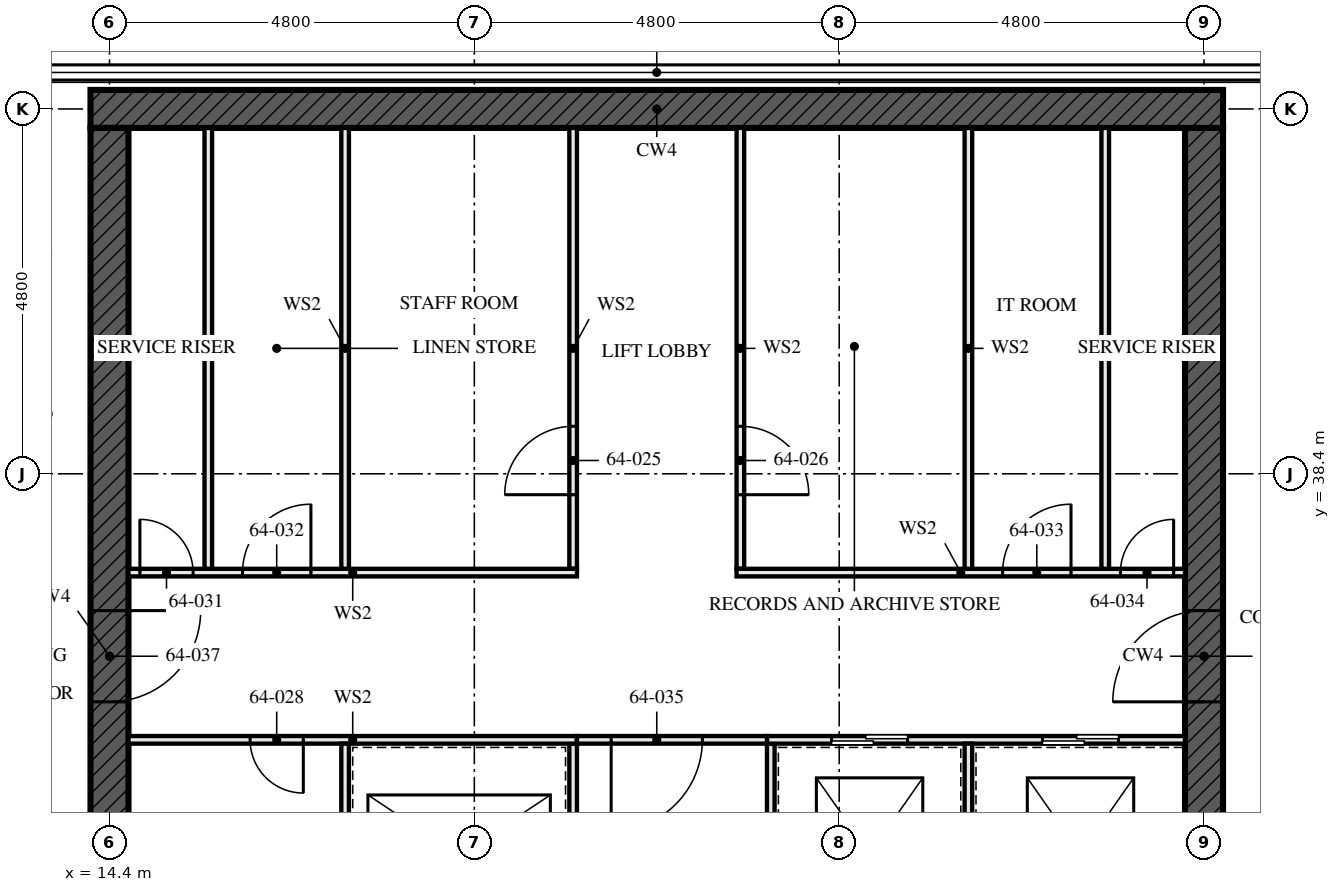
"""IFC4 building model, lengths in metres.
Left out: names, types, materials, properties, quantities, classifications, styles, units other than length and angle.
Written with IfcOpenShell. Run it as: python <this file> out.ifc"""

import sys

from ifc_helpers import new_model, si_unit, direction, frame, frame_2d, origin, place, context, subcontext, project, spatial, rectangle, extrude, element, fill, save


model = new_model("IFC4")
c1 = context("Model", 3, precision=1e-05, world=origin(), true_north=direction((0.0, 1.0)))
c2 = subcontext(c1, "Body", "Model", "MODEL_VIEW")
j1 = project(units=[si_unit("LENGTHUNIT", "METRE"), si_unit("PLANEANGLEUNIT", "RADIAN")], contexts=[c1])
p1 = place(None, origin())
s1 = spatial("IfcSite", under=j1, at=p1, CompositionType="ELEMENT")
p2 = place(p1, origin())
s2 = spatial("IfcBuilding", under=s1, at=p2, CompositionType="ELEMENT")
p3 = place(p2, frame((0.0, 0.0, 233.0)))
s3 = spatial("IfcBuildingStorey", under=s2, at=p3, CompositionType="ELEMENT", Elevation=233.0)
p4 = place(p3, frame((29.05, 43.2, -0.17), z_axis=(0.0, 0.0, 1.0), x_axis=(-1.0, 0.0, 0.0)))
e1 = element("IfcWall", 1, at=p4, inside=s3, PredefinedType="SHEAR", context=c2, shape_type="SweptSolid", body=[
    extrude(rectangle(XDim=14.9, YDim=0.5, at=frame_2d((7.45, 0.0))), origin(), (0.0, 0.0, 1.0), 3.5),
])
p5 = place(p3, frame((14.4, 42.95, -0.17), z_axis=(0.0, 0.0, 1.0), x_axis=(0.0, -1.0, 0.0)))
e2 = element("IfcWall", 2, at=p5, inside=s3, PredefinedType="SHEAR", context=c2, shape_type="SweptSolid", body=[
    extrude(rectangle(XDim=13.9, YDim=0.5, at=frame_2d((6.95, 0.0))), origin(), (0.0, 0.0, 1.0), 3.5),
])
p6 = place(p5, frame((6.35, 0.0, 0.17)))
e3 = element("IfcOpeningElement", 3, at=p6, cuts=e2, PredefinedType="OPENING", context=c2, shape_type="SweptSolid", body=[
    extrude(rectangle(XDim=1.2, YDim=2.1, at=frame_2d((0.6, 1.05))), frame((0.0, 0.26, 0.0), z_axis=(0.0, -1.0, 0.0), x_axis=(1.0, 0.0, 0.0)), (0.0, 0.0, 1.0), 0.521),
])
p7 = place(p3, frame((28.8, 29.05, -0.17), z_axis=(0.0, 0.0, 1.0), x_axis=(0.0, 1.0, 0.0)))
e4 = element("IfcWall", 4, at=p7, inside=s3, PredefinedType="SHEAR", context=c2, shape_type="SweptSolid", body=[
    extrude(rectangle(XDim=13.9, YDim=0.5, at=frame_2d((6.95, 0.0))), origin(), (0.0, 0.0, 1.0), 3.5),
])
p8 = place(p7, frame((6.35, 0.0, 0.17)))
e5 = element("IfcOpeningElement", 5, at=p8, cuts=e4, PredefinedType="OPENING", context=c2, shape_type="SweptSolid", body=[
    extrude(rectangle(XDim=1.2, YDim=2.1, at=frame_2d((0.6, 1.05))), frame((0.0, 0.26, 0.0), z_axis=(0.0, -1.0, 0.0), x_axis=(1.0, 0.0, 0.0)), (0.0, 0.0, 1.0), 0.521),
])
for number, where, z_axis, x_axis in (
    (6, (15.7, 37.15, 0.0), (0.0, 0.0, 1.0), (0.0, 1.0, 0.0)),
    (7, (27.5, 37.15, 0.0), (0.0, 0.0, 1.0), (0.0, 1.0, 0.0)),
):
    element("IfcWall", number, at=place(p3, frame(where, z_axis=z_axis, x_axis=x_axis)), inside=s3, PredefinedType="SOLIDWALL", context=c2, shape_type="SweptSolid", body=[
        extrude(rectangle(XDim=5.8, YDim=0.1, at=frame_2d((2.9, 0.0))), origin(), (0.0, 0.0, 1.0), 3.33),
    ])
p9 = place(p3, frame((20.5, 29.05, 0.0), z_axis=(0.0, 0.0, 1.0), x_axis=(0.0, 1.0, 0.0)))
e8 = element("IfcWall", 8, at=p9, inside=s3, PredefinedType="SOLIDWALL", context=c2, shape_type="SweptSolid", body=[
    extrude(rectangle(XDim=5.8, YDim=0.1, at=frame_2d((2.9, 0.0))), origin(), (0.0, 0.0, 1.0), 3.33),
])
p10 = place(p9, frame((0.8, 0.0, 0.0)))
e9 = element("IfcOpeningElement", 9, at=p10, cuts=e8, PredefinedType="OPENING", context=c2, shape_type="SweptSolid", body=[
    extrude(rectangle(XDim=1.1, YDim=2.3, at=frame_2d((0.55, 1.15))), frame((0.0, 0.061, 0.0), z_axis=(0.0, -1.0, 0.0), x_axis=(1.0, 0.0, 0.0)), (0.0, 0.0, 1.0), 0.121),
])
p11 = place(p9, frame((3.775, 0.0, 0.0)))
e10 = element("IfcOpeningElement", 10, at=p11, cuts=e8, PredefinedType="OPENING", context=c2, shape_type="SweptSolid", body=[
    extrude(rectangle(XDim=1.1, YDim=2.3, at=frame_2d((0.55, 1.15))), frame((0.0, 0.061, 0.0), z_axis=(0.0, -1.0, 0.0), x_axis=(1.0, 0.0, 0.0)), (0.0, 0.0, 1.0), 0.121),
])
p12 = place(p3, frame((20.5, 37.15, 0.0), z_axis=(0.0, 0.0, 1.0), x_axis=(0.0, 1.0, 0.0)))
e11 = element("IfcWall", 11, at=p12, inside=s3, PredefinedType="SOLIDWALL", context=c2, shape_type="SweptSolid", body=[
    extrude(rectangle(XDim=5.8, YDim=0.1, at=frame_2d((2.9, 0.0))), origin(), (0.0, 0.0, 1.0), 3.33),
])
p13 = place(p12, frame((0.975, 0.0, 0.0)))
e12 = element("IfcOpeningElement", 12, at=p13, cuts=e11, PredefinedType="OPENING", context=c2, shape_type="SweptSolid", body=[
    extrude(rectangle(XDim=0.9, YDim=2.1, at=frame_2d((0.45, 1.05))), frame((0.0, 0.061, 0.0), z_axis=(0.0, -1.0, 0.0), x_axis=(1.0, 0.0, 0.0)), (0.0, 0.0, 1.0), 0.121),
])
p14 = place(p3, frame((22.7, 37.15, 0.0), z_axis=(0.0, 0.0, 1.0), x_axis=(0.0, 1.0, 0.0)))
e13 = element("IfcWall", 13, at=p14, inside=s3, PredefinedType="SOLIDWALL", context=c2, shape_type="SweptSolid", body=[
    extrude(rectangle(XDim=5.8, YDim=0.1, at=frame_2d((2.9, 0.0))), origin(), (0.0, 0.0, 1.0), 3.33),
])
p15 = place(p14, frame((0.975, 0.0, 0.0)))
e14 = element("IfcOpeningElement", 14, at=p15, cuts=e13, PredefinedType="OPENING", context=c2, shape_type="SweptSolid", body=[
    extrude(rectangle(XDim=0.9, YDim=2.1, at=frame_2d((0.45, 1.05))), frame((0.0, 0.061, 0.0), z_axis=(0.0, -1.0, 0.0), x_axis=(1.0, 0.0, 0.0)), (0.0, 0.0, 1.0), 0.121),
])
p16 = place(p3, frame((23.1, 29.05, 0.0), z_axis=(0.0, 0.0, 1.0), x_axis=(0.0, 1.0, 0.0)))
e15 = element("IfcWall", 15, at=p16, inside=s3, PredefinedType="SOLIDWALL", context=c2, shape_type="SweptSolid", body=[
    extrude(rectangle(XDim=5.8, YDim=0.1, at=frame_2d((2.9, 0.0))), origin(), (0.0, 0.0, 1.0), 3.33),
])
p17 = place(p16, frame((1.0, 0.0, 0.0)))
e16 = element("IfcOpeningElement", 16, at=p17, cuts=e15, PredefinedType="OPENING", context=c2, shape_type="SweptSolid", body=[
    extrude(rectangle(XDim=0.7, YDim=2.1, at=frame_2d((0.35, 1.05))), frame((0.0, 0.061, 0.0), z_axis=(0.0, -1.0, 0.0), x_axis=(1.0, 0.0, 0.0)), (0.0, 0.0, 1.0), 0.121),
])
p18 = place(p3, frame((14.65, 34.9, 0.0), z_axis=(0.0, 0.0, 1.0), x_axis=(1.0, 0.0, 0.0)))
e17 = element("IfcWall", 17, at=p18, inside=s3, PredefinedType="SOLIDWALL", context=c2, shape_type="SweptSolid", body=[
    extrude(rectangle(XDim=5.9, YDim=0.1, at=frame_2d((2.95, 0.0))), origin(), (0.0, 0.0, 1.0), 3.33),
])
p19 = place(p18, frame((1.6, 0.0, 0.0)))
e18 = element("IfcOpeningElement", 18, at=p19, cuts=e17, PredefinedType="OPENING", context=c2, shape_type="SweptSolid", body=[
    extrude(rectangle(XDim=0.7, YDim=2.1, at=frame_2d((0.35, 1.05))), frame((0.0, 0.061, 0.0), z_axis=(0.0, -1.0, 0.0), x_axis=(1.0, 0.0, 0.0)), (0.0, 0.0, 1.0), 0.121),
])
p20 = place(p3, frame((23.05, 34.9, 0.0), z_axis=(0.0, 0.0, 1.0), x_axis=(1.0, 0.0, 0.0)))
e19 = element("IfcWall", 19, at=p20, inside=s3, PredefinedType="SOLIDWALL", context=c2, shape_type="SweptSolid", body=[
    extrude(rectangle(XDim=5.5, YDim=0.1, at=frame_2d((2.75, 0.0))), origin(), (0.0, 0.0, 1.0), 3.33),
])
p21 = place(p20, frame((0.85, 0.0, 0.0)))
e20 = element("IfcOpeningElement", 20, at=p21, cuts=e19, PredefinedType="OPENING", context=c2, shape_type="SweptSolid", body=[
    extrude(rectangle(XDim=1.0, YDim=2.1, at=frame_2d((0.5, 1.05))), frame((0.0, 0.061, 0.0), z_axis=(0.0, -1.0, 0.0), x_axis=(1.0, 0.0, 0.0)), (0.0, 0.0, 1.0), 0.121),
])
p22 = place(p20, frame((3.625, 0.0, 0.0)))
e21 = element("IfcOpeningElement", 21, at=p22, cuts=e19, PredefinedType="OPENING", context=c2, shape_type="SweptSolid", body=[
    extrude(rectangle(XDim=1.0, YDim=2.1, at=frame_2d((0.5, 1.05))), frame((0.0, 0.061, 0.0), z_axis=(0.0, -1.0, 0.0), x_axis=(1.0, 0.0, 0.0)), (0.0, 0.0, 1.0), 0.121),
])
p23 = place(p3, frame((14.65, 37.1, 0.0), z_axis=(0.0, 0.0, 1.0), x_axis=(1.0, 0.0, 0.0)))
e22 = element("IfcWall", 22, at=p23, inside=s3, PredefinedType="SOLIDWALL", context=c2, shape_type="SweptSolid", body=[
    extrude(rectangle(XDim=5.9, YDim=0.1, at=frame_2d((2.95, 0.0))), origin(), (0.0, 0.0, 1.0), 3.33),
])
p24 = place(p23, frame((0.15, 0.0, 0.0)))
e23 = element("IfcOpeningElement", 23, at=p24, cuts=e22, PredefinedType="OPENING", context=c2, shape_type="SweptSolid", body=[
    extrude(rectangle(XDim=0.7, YDim=2.1, at=frame_2d((0.35, 1.05))), frame((0.0, 0.061, 0.0), z_axis=(0.0, -1.0, 0.0), x_axis=(1.0, 0.0, 0.0)), (0.0, 0.0, 1.0), 0.121),
])
p25 = place(p23, frame((1.5, 0.0, 0.0)))
e24 = element("IfcOpeningElement", 24, at=p25, cuts=e22, PredefinedType="OPENING", context=c2, shape_type="SweptSolid", body=[
    extrude(rectangle(XDim=0.9, YDim=2.1, at=frame_2d((0.45, 1.05))), frame((0.0, 0.061, 0.0), z_axis=(0.0, -1.0, 0.0), x_axis=(1.0, 0.0, 0.0)), (0.0, 0.0, 1.0), 0.121),
])
p26 = place(p3, frame((22.65, 37.1, 0.0), z_axis=(0.0, 0.0, 1.0), x_axis=(1.0, 0.0, 0.0)))
e25 = element("IfcWall", 25, at=p26, inside=s3, PredefinedType="SOLIDWALL", context=c2, shape_type="SweptSolid", body=[
    extrude(rectangle(XDim=5.9, YDim=0.1, at=frame_2d((2.95, 0.0))), origin(), (0.0, 0.0, 1.0), 3.33),
])
p27 = place(p26, frame((3.5, 0.0, 0.0)))
e26 = element("IfcOpeningElement", 26, at=p27, cuts=e25, PredefinedType="OPENING", context=c2, shape_type="SweptSolid", body=[
    extrude(rectangle(XDim=0.9, YDim=2.1, at=frame_2d((0.45, 1.05))), frame((0.0, 0.061, 0.0), z_axis=(0.0, -1.0, 0.0), x_axis=(1.0, 0.0, 0.0)), (0.0, 0.0, 1.0), 0.121),
])
p28 = place(p26, frame((5.05, 0.0, 0.0)))
e27 = element("IfcOpeningElement", 27, at=p28, cuts=e25, PredefinedType="OPENING", context=c2, shape_type="SweptSolid", body=[
    extrude(rectangle(XDim=0.7, YDim=2.1, at=frame_2d((0.35, 1.05))), frame((0.0, 0.061, 0.0), z_axis=(0.0, -1.0, 0.0), x_axis=(1.0, 0.0, 0.0)), (0.0, 0.0, 1.0), 0.121),
])
p29 = place(p3, frame((20.55, 34.9, 0.0), z_axis=(0.0, 0.0, 1.0), x_axis=(1.0, 0.0, 0.0)))
e28 = element("IfcWall", 28, at=p29, inside=s3, PredefinedType="SOLIDWALL", context=c2, shape_type="SweptSolid", body=[
    extrude(rectangle(XDim=2.5, YDim=0.1, at=frame_2d((1.25, 0.0))), origin(), (0.0, 0.0, 1.0), 3.33),
])
p30 = place(p29, frame((0.45, 0.0, 0.0)))
e29 = element("IfcOpeningElement", 29, at=p30, cuts=e28, PredefinedType="OPENING", context=c2, shape_type="SweptSolid", body=[
    extrude(rectangle(XDim=1.2, YDim=2.1, at=frame_2d((0.6, 1.05))), frame((0.0, 0.061, 0.0), z_axis=(0.0, -1.0, 0.0), x_axis=(1.0, 0.0, 0.0)), (0.0, 0.0, 1.0), 0.121),
])
for number, where, z_axis, x_axis in (
    (30, (17.5, 29.05, 0.0), (0.0, 0.0, 1.0), (0.0, 1.0, 0.0)),
    (31, (17.5, 37.15, 0.0), (0.0, 0.0, 1.0), (0.0, 1.0, 0.0)),
    (32, (25.7, 37.15, 0.0), (0.0, 0.0, 1.0), (0.0, 1.0, 0.0)),
):
    element("IfcWall", number, at=place(p3, frame(where, z_axis=z_axis, x_axis=x_axis)), inside=s3, PredefinedType="SOLIDWALL", context=c2, shape_type="SweptSolid", body=[
        extrude(rectangle(XDim=5.8, YDim=0.1, at=frame_2d((2.9, 0.0))), origin(), (0.0, 0.0, 1.0), 3.33),
    ])
p31 = place(p3, frame((25.7, 31.95, 0.0), z_axis=(0.0, 0.0, 1.0), x_axis=(0.0, 1.0, 0.0)))
e33 = element("IfcWall", 33, at=p31, inside=s3, PredefinedType="SOLIDWALL", context=c2, shape_type="SweptSolid", body=[
    extrude(rectangle(XDim=2.9, YDim=0.1, at=frame_2d((1.45, 0.0))), origin(), (0.0, 0.0, 1.0), 3.33),
])
p32 = place(p13, origin())
e34 = element("IfcDoor", 34, at=p32, inside=s3, OperationType="SINGLE_SWING_RIGHT", PredefinedType="DOOR", context=c2, shape_type="SweptSolid", body=[
    extrude(rectangle(XDim=0.9, YDim=2.1, at=frame_2d((0.45, 1.05))), frame((0.0, 0.027, 0.0), z_axis=(0.0, -1.0, 0.0), x_axis=(1.0, 0.0, 0.0)), (0.0, 0.0, 1.0), 0.054),
])
fill(e12, e34)
p33 = place(p15, frame((0.9, 0.0, 0.0), z_axis=(0.0, 0.0, 1.0), x_axis=(-1.0, 0.0, 0.0)))
e35 = element("IfcDoor", 35, at=p33, inside=s3, OperationType="SINGLE_SWING_LEFT", PredefinedType="DOOR", context=c2, shape_type="SweptSolid", body=[
    extrude(rectangle(XDim=0.9, YDim=2.1, at=frame_2d((0.45, 1.05))), frame((0.0, 0.027, 0.0), z_axis=(0.0, -1.0, 0.0), x_axis=(1.0, 0.0, 0.0)), (0.0, 0.0, 1.0), 0.054),
])
fill(e14, e35)
p34 = place(p19, frame((0.7, 0.0, 0.0), z_axis=(0.0, 0.0, 1.0), x_axis=(-1.0, 0.0, 0.0)))
e36 = element("IfcDoor", 36, at=p34, inside=s3, OperationType="SINGLE_SWING_RIGHT", PredefinedType="DOOR", context=c2, shape_type="SweptSolid", body=[
    extrude(rectangle(XDim=0.7, YDim=2.1, at=frame_2d((0.35, 1.05))), frame((0.0, 0.027, 0.0), z_axis=(0.0, -1.0, 0.0), x_axis=(1.0, 0.0, 0.0)), (0.0, 0.0, 1.0), 0.054),
])
fill(e18, e36)
p35 = place(p21, origin())
e37 = element("IfcDoor", 37, at=p35, inside=s3, OperationType="SLIDING_TO_LEFT", PredefinedType="DOOR", context=c2, shape_type="SweptSolid", body=[
    extrude(rectangle(XDim=1.0, YDim=2.1, at=frame_2d((0.5, 1.05))), frame((0.0, 0.05, 0.0), z_axis=(0.0, -1.0, 0.0), x_axis=(1.0, 0.0, 0.0)), (0.0, 0.0, 1.0), 0.1),
])
fill(e20, e37)
p36 = place(p22, origin())
e38 = element("IfcDoor", 38, at=p36, inside=s3, OperationType="SLIDING_TO_LEFT", PredefinedType="DOOR", context=c2, shape_type="SweptSolid", body=[
    extrude(rectangle(XDim=1.0, YDim=2.1, at=frame_2d((0.5, 1.05))), frame((0.0, 0.05, 0.0), z_axis=(0.0, -1.0, 0.0), x_axis=(1.0, 0.0, 0.0)), (0.0, 0.0, 1.0), 0.1),
])
fill(e21, e38)
p37 = place(p24, origin())
e39 = element("IfcDoor", 39, at=p37, inside=s3, OperationType="SINGLE_SWING_RIGHT", PredefinedType="DOOR", context=c2, shape_type="SweptSolid", body=[
    extrude(rectangle(XDim=0.7, YDim=2.1, at=frame_2d((0.35, 1.05))), frame((0.0, 0.027, 0.0), z_axis=(0.0, -1.0, 0.0), x_axis=(1.0, 0.0, 0.0)), (0.0, 0.0, 1.0), 0.054),
])
fill(e23, e39)
p38 = place(p25, origin())
e40 = element("IfcDoor", 40, at=p38, inside=s3, OperationType="SINGLE_SWING_LEFT", PredefinedType="DOOR", context=c2, shape_type="SweptSolid", body=[
    extrude(rectangle(XDim=0.9, YDim=2.1, at=frame_2d((0.45, 1.05))), frame((0.0, 0.027, 0.0), z_axis=(0.0, -1.0, 0.0), x_axis=(1.0, 0.0, 0.0)), (0.0, 0.0, 1.0), 0.054),
])
fill(e24, e40)
p39 = place(p27, origin())
e41 = element("IfcDoor", 41, at=p39, inside=s3, OperationType="SINGLE_SWING_LEFT", PredefinedType="DOOR", context=c2, shape_type="SweptSolid", body=[
    extrude(rectangle(XDim=0.9, YDim=2.1, at=frame_2d((0.45, 1.05))), frame((0.0, 0.027, 0.0), z_axis=(0.0, -1.0, 0.0), x_axis=(1.0, 0.0, 0.0)), (0.0, 0.0, 1.0), 0.054),
])
fill(e26, e41)
p40 = place(p28, origin())
e42 = element("IfcDoor", 42, at=p40, inside=s3, OperationType="SINGLE_SWING_LEFT", PredefinedType="DOOR", context=c2, shape_type="SweptSolid", body=[
    extrude(rectangle(XDim=0.7, YDim=2.1, at=frame_2d((0.35, 1.05))), frame((0.0, 0.027, 0.0), z_axis=(0.0, -1.0, 0.0), x_axis=(1.0, 0.0, 0.0)), (0.0, 0.0, 1.0), 0.054),
])
fill(e27, e42)
p41 = place(p30, frame((1.2, 0.0, 0.0), z_axis=(0.0, 0.0, 1.0), x_axis=(-1.0, 0.0, 0.0)))
e43 = element("IfcDoor", 43, at=p41, inside=s3, OperationType="SINGLE_SWING_LEFT", PredefinedType="DOOR", context=c2, shape_type="SweptSolid", body=[
    extrude(rectangle(XDim=1.2, YDim=2.1, at=frame_2d((0.6, 1.05))), frame((0.0, 0.027, 0.0), z_axis=(0.0, -1.0, 0.0), x_axis=(1.0, 0.0, 0.0)), (0.0, 0.0, 1.0), 0.054),
])
fill(e29, e43)
p42 = place(p6, origin())
e44 = element("IfcDoor", 44, at=p42, inside=s3, OperationType="SINGLE_SWING_LEFT", PredefinedType="DOOR", context=c2, shape_type="SweptSolid", body=[
    extrude(rectangle(XDim=1.2, YDim=2.1, at=frame_2d((0.6, 1.05))), frame((0.0, 0.027, 0.0), z_axis=(0.0, -1.0, 0.0), x_axis=(1.0, 0.0, 0.0)), (0.0, 0.0, 1.0), 0.054),
])
fill(e3, e44)
p43 = place(p8, origin())
e45 = element("IfcDoor", 45, at=p43, inside=s3, OperationType="SINGLE_SWING_LEFT", PredefinedType="DOOR", context=c2, shape_type="SweptSolid", body=[
    extrude(rectangle(XDim=1.2, YDim=2.1, at=frame_2d((0.6, 1.05))), frame((0.0, 0.027, 0.0), z_axis=(0.0, -1.0, 0.0), x_axis=(1.0, 0.0, 0.0)), (0.0, 0.0, 1.0), 0.054),
])
fill(e5, e45)
save(model, sys.argv[1])
